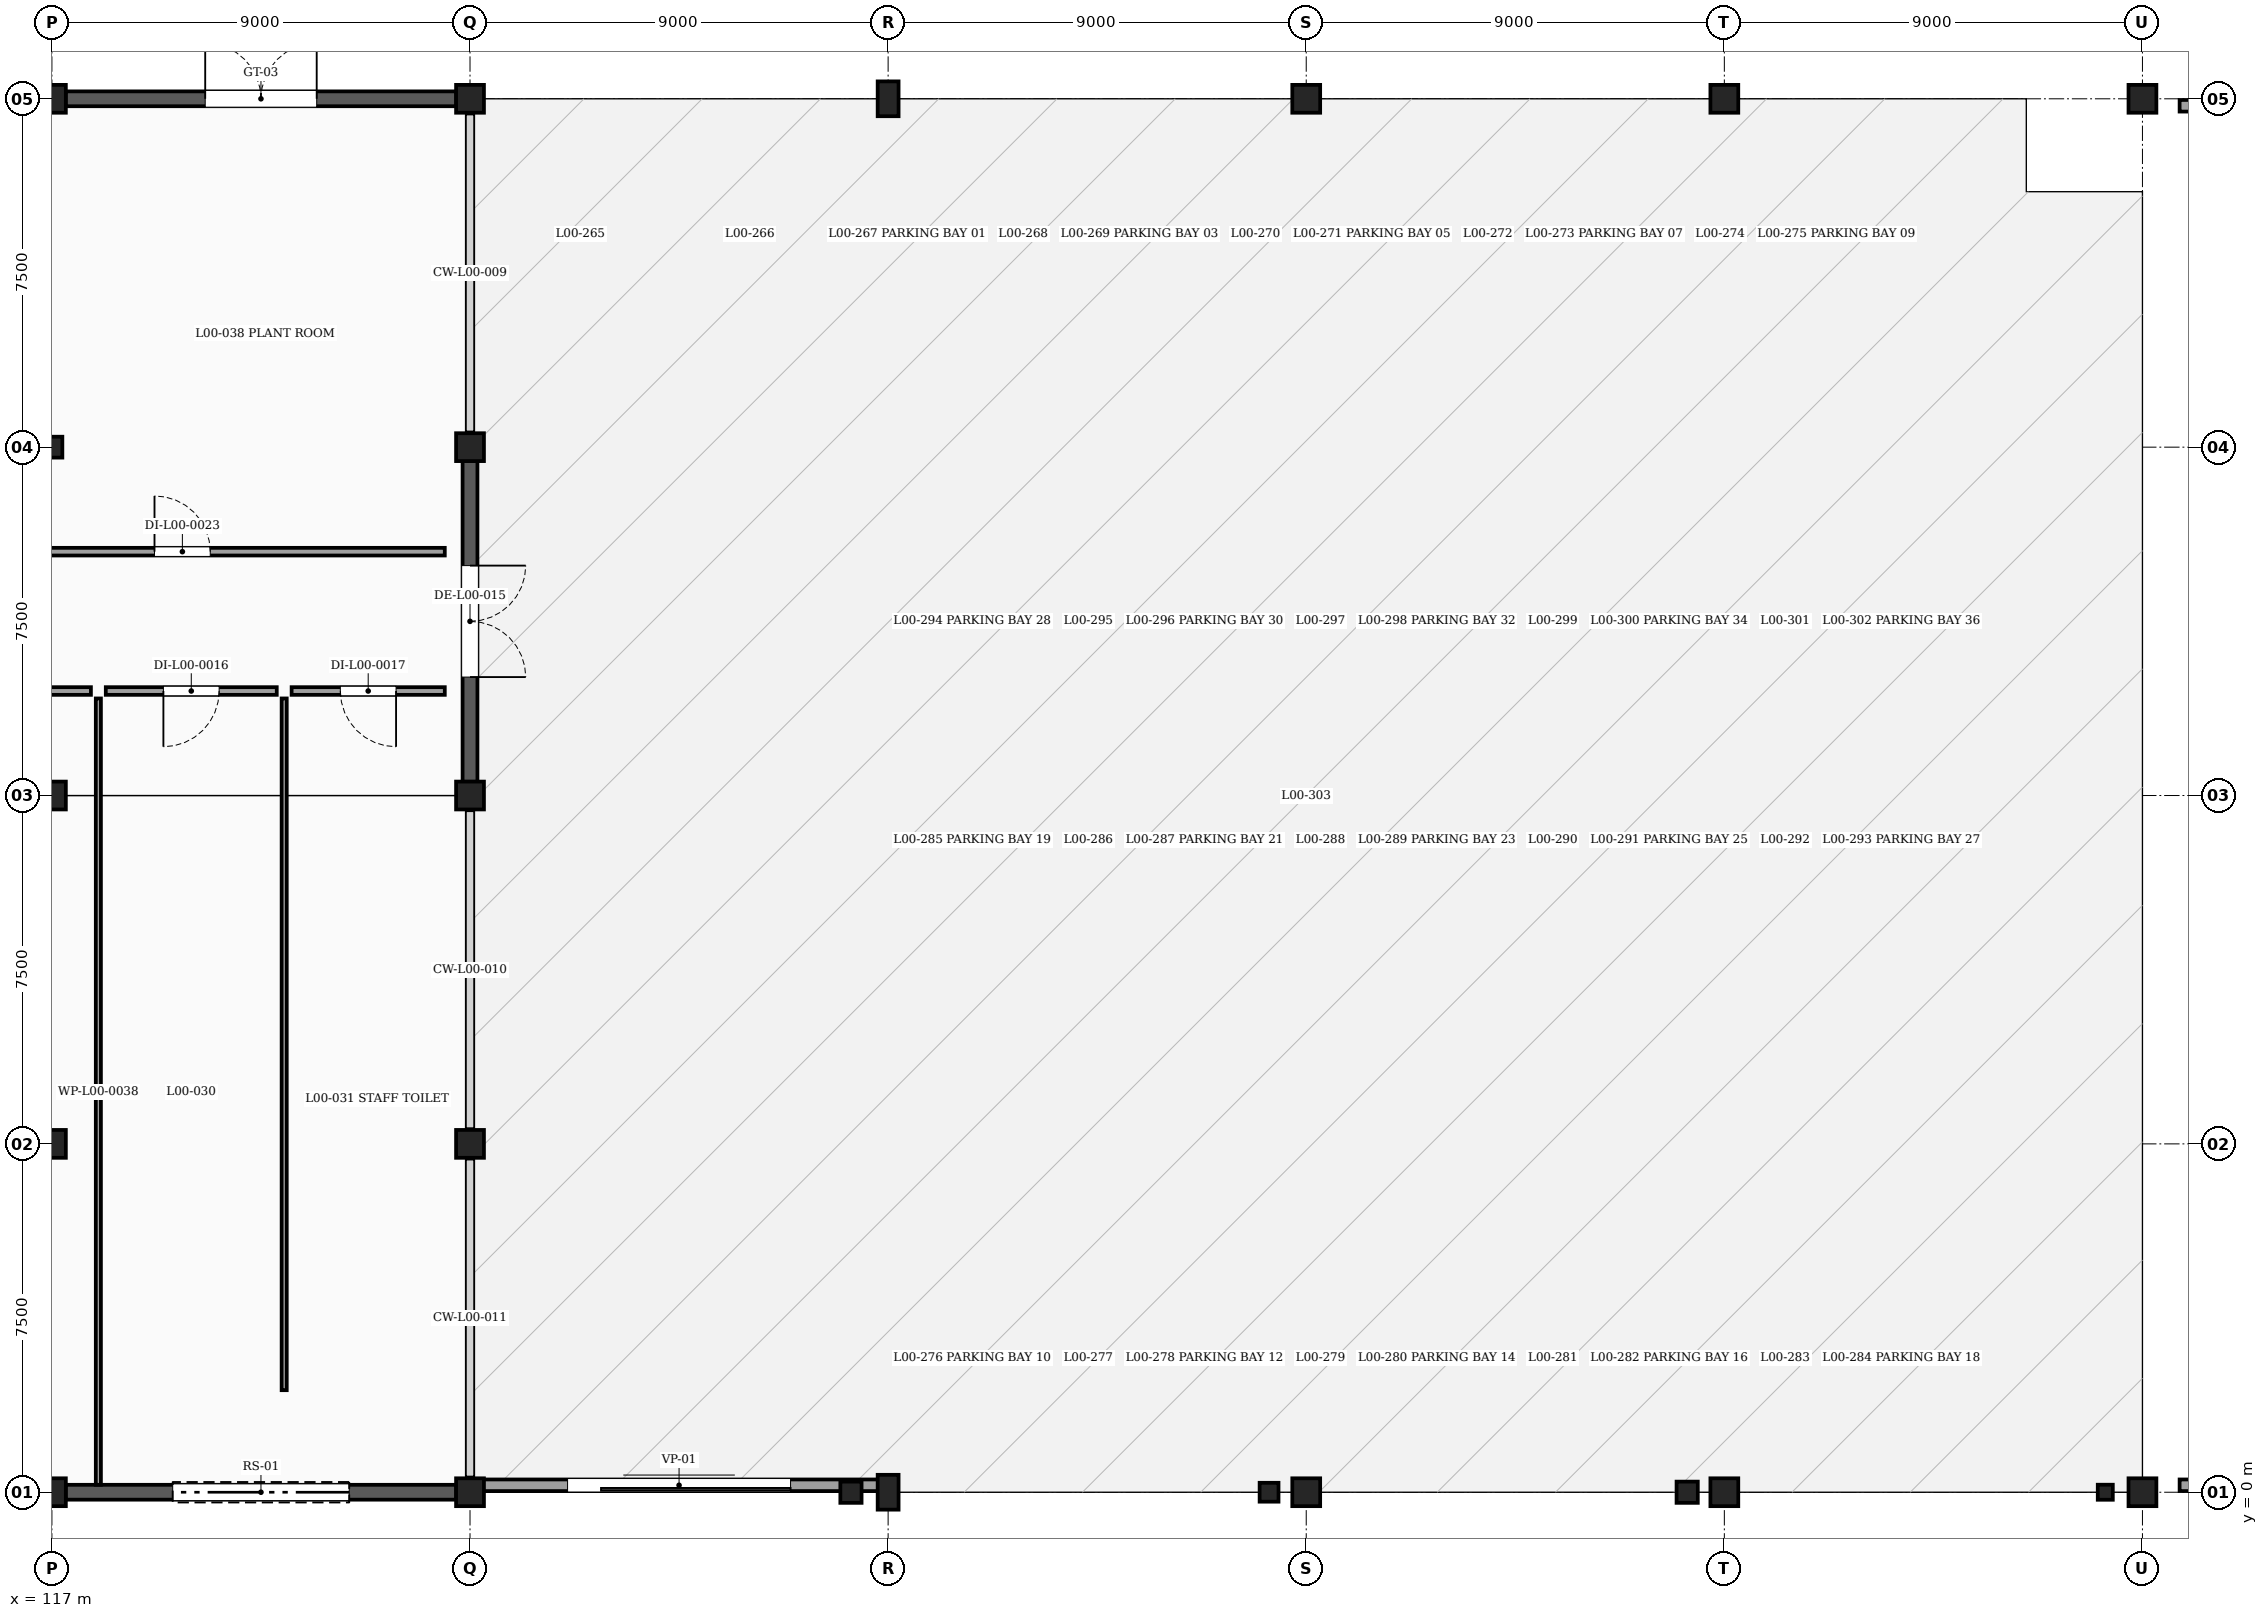
"""IFC4 building model, lengths in metres.
Left out: names, types, materials, properties, quantities, classifications, styles, units other than length and angle.
Written with IfcOpenShell. Run it as: python <this file> out.ifc"""

import sys

from ifc_helpers import new_model, si_unit, direction, frame, frame_2d, origin, origin_2d, place, context, subcontext, project, spatial, rectangle, hollow_circle, extrude, element, fill, save


model = new_model("IFC4")
c1 = context("Model", 3, precision=1e-05, world=origin(), true_north=direction((0.0, 1.0)))
c2 = subcontext(c1, "Body", "Model", "MODEL_VIEW")
j1 = project(units=[si_unit("LENGTHUNIT", "METRE"), si_unit("PLANEANGLEUNIT", "RADIAN")], contexts=[c1])
p1 = place(None, origin())
s1 = spatial("IfcSite", under=j1, at=p1, CompositionType="ELEMENT")
p2 = place(p1, origin())
s2 = spatial("IfcBuilding", under=s1, at=p2, CompositionType="ELEMENT")
p3 = place(p2, origin())
s3 = spatial("IfcBuildingStorey", under=s2, at=p3, CompositionType="ELEMENT", Elevation=0.0)
for number, where, z_axis, x_axis in (
    (1, (117.0, 0.0, -0.25), (0.0, 0.0, 1.0), (1.0, 0.0, 0.0)),
    (2, (126.0, 0.0, -0.25), (0.0, 0.0, 1.0), (1.0, 0.0, 0.0)),
):
    element("IfcColumn", number, at=place(p3, frame(where, z_axis=z_axis, x_axis=x_axis)), inside=s3, PredefinedType="COLUMN", context=c2, shape_type="SweptSolid", body=[
        extrude(rectangle(XDim=0.6, YDim=0.6, at=origin_2d()), origin(), (0.0, 0.0, 1.0), 4.75),
    ])
p4 = place(p3, frame((135.0, 0.0, -0.25), z_axis=(0.0, 0.0, 1.0), x_axis=(1.0, 0.0, 0.0)))
e3 = element("IfcColumn", 3, at=p4, inside=s3, PredefinedType="COLUMN", context=c2, shape_type="SweptSolid", body=[
    extrude(rectangle(XDim=0.45, YDim=0.75, at=origin_2d()), origin(), (0.0, 0.0, 1.0), 4.75),
])
for number, where, z_axis, x_axis in (
    (4, (144.0, 0.0, -0.25), (0.0, 0.0, 1.0), (1.0, 0.0, 0.0)),
    (5, (153.0, 0.0, -0.25), (0.0, 0.0, 1.0), (1.0, 0.0, 0.0)),
    (6, (162.0, 0.0, -0.25), (0.0, 0.0, 1.0), (1.0, 0.0, 0.0)),
    (7, (117.0, 7.5, -0.25), (0.0, 0.0, 1.0), (1.0, 0.0, 0.0)),
    (8, (126.0, 7.5, -0.25), (0.0, 0.0, 1.0), (1.0, 0.0, 0.0)),
    (9, (117.0, 15.0, -0.25), (0.0, 0.0, 1.0), (1.0, 0.0, 0.0)),
    (10, (126.0, 15.0, -0.25), (0.0, 0.0, 1.0), (1.0, 0.0, 0.0)),
):
    element("IfcColumn", number, at=place(p3, frame(where, z_axis=z_axis, x_axis=x_axis)), inside=s3, PredefinedType="COLUMN", context=c2, shape_type="SweptSolid", body=[
        extrude(rectangle(XDim=0.6, YDim=0.6, at=origin_2d()), origin(), (0.0, 0.0, 1.0), 4.75),
    ])
p5 = place(p3, frame((117.0, 22.5, -0.25), z_axis=(0.0, 0.0, 1.0), x_axis=(1.0, 0.0, 0.0)))
e11 = element("IfcColumn", 11, at=p5, inside=s3, PredefinedType="COLUMN", context=c2, shape_type="SweptSolid", body=[
    extrude(rectangle(XDim=0.45, YDim=0.45, at=origin_2d()), origin(), (0.0, 0.0, 1.0), 4.75),
])
for number, where, z_axis, x_axis in (
    (12, (126.0, 22.5, -0.25), (0.0, 0.0, 1.0), (1.0, 0.0, 0.0)),
    (13, (117.0, 30.0, -0.25), (0.0, 0.0, 1.0), (1.0, 0.0, 0.0)),
    (14, (126.0, 30.0, -0.25), (0.0, 0.0, 1.0), (1.0, 0.0, 0.0)),
):
    element("IfcColumn", number, at=place(p3, frame(where, z_axis=z_axis, x_axis=x_axis)), inside=s3, PredefinedType="COLUMN", context=c2, shape_type="SweptSolid", body=[
        extrude(rectangle(XDim=0.6, YDim=0.6, at=origin_2d()), origin(), (0.0, 0.0, 1.0), 4.75),
    ])
p6 = place(p3, frame((135.0, 30.0, -0.25), z_axis=(0.0, 0.0, 1.0), x_axis=(1.0, 0.0, 0.0)))
e15 = element("IfcColumn", 15, at=p6, inside=s3, PredefinedType="COLUMN", context=c2, shape_type="SweptSolid", body=[
    extrude(rectangle(XDim=0.45, YDim=0.75, at=origin_2d()), origin(), (0.0, 0.0, 1.0), 4.75),
])
for number, where, z_axis, x_axis in (
    (16, (144.0, 30.0, -0.25), (0.0, 0.0, 1.0), (1.0, 0.0, 0.0)),
    (17, (153.0, 30.0, -0.25), (0.0, 0.0, 1.0), (1.0, 0.0, 0.0)),
    (18, (162.0, 30.0, -0.25), (0.0, 0.0, 1.0), (1.0, 0.0, 0.0)),
):
    element("IfcColumn", number, at=place(p3, frame(where, z_axis=z_axis, x_axis=x_axis)), inside=s3, PredefinedType="COLUMN", context=c2, shape_type="SweptSolid", body=[
        extrude(rectangle(XDim=0.6, YDim=0.6, at=origin_2d()), origin(), (0.0, 0.0, 1.0), 4.75),
    ])
p7 = place(p3, frame((134.2, 0.0, -0.25), z_axis=(0.02841796458, 0.0, 0.999596128088), x_axis=(0.0, 1.0, 0.0)))
e19 = element("IfcColumn", 19, at=p7, inside=s3, PredefinedType="PILASTER", context=c2, shape_type="SweptSolid", body=[
    extrude(hollow_circle(Radius=0.229, WallThickness=0.013, at=origin_2d()), origin(), (0.0, 0.0, 1.0), 4.227),
])
p8 = place(p3, frame((143.2, 0.0, -0.25), z_axis=(0.02841796458, 0.0, 0.999596128088), x_axis=(0.0, 1.0, 0.0)))
e20 = element("IfcColumn", 20, at=p8, inside=s3, PredefinedType="PILASTER", context=c2, shape_type="SweptSolid", body=[
    extrude(hollow_circle(Radius=0.203, WallThickness=0.013, at=origin_2d()), origin(), (0.0, 0.0, 1.0), 4.227),
])
p9 = place(p3, frame((152.2, 0.0, -0.25), z_axis=(0.02841796458, 0.0, 0.999596128088), x_axis=(0.0, 1.0, 0.0)))
e21 = element("IfcColumn", 21, at=p9, inside=s3, PredefinedType="PILASTER", context=c2, shape_type="SweptSolid", body=[
    extrude(hollow_circle(Radius=0.229, WallThickness=0.013, at=origin_2d()), origin(), (0.0, 0.0, 1.0), 4.227),
])
p10 = place(p3, frame((161.2, 0.0, -0.25), z_axis=(0.02841796458, 0.0, 0.999596128088), x_axis=(0.0, 1.0, 0.0)))
e22 = element("IfcColumn", 22, at=p10, inside=s3, PredefinedType="PILASTER", context=c2, shape_type="SweptSolid", body=[
    extrude(hollow_circle(Radius=0.162, WallThickness=0.01, at=origin_2d()), origin(), (0.0, 0.0, 1.0), 4.227),
])
p11 = place(p3, frame((117.296, 30.0, 0.0), z_axis=(0.0, 0.0, 1.0), x_axis=(1.0, 0.0, 0.0)))
e23 = element("IfcWall", 23, at=p11, inside=s3, PredefinedType="SOLIDWALL", context=c2, shape_type="SweptSolid", body=[
    extrude(rectangle(XDim=8.408, YDim=0.32, at=frame_2d((4.204, 0.0))), origin(), (0.0, 0.0, 1.0), 4.1),
])
p12 = place(p11, frame((3.004, 0.0, 0.0)))
e24 = element("IfcOpeningElement", 24, at=p12, cuts=e23, PredefinedType="OPENING", context=c2, shape_type="SweptSolid", body=[
    extrude(rectangle(XDim=2.4, YDim=2.4, at=frame_2d((1.2, 1.2))), frame((0.0, 0.17, 0.0), z_axis=(0.0, -1.0, 0.0), x_axis=(1.0, 0.0, 0.0)), (0.0, 0.0, 1.0), 0.34),
])
p13 = place(p3, frame((126.0, 22.204, 0.0), z_axis=(0.0, 0.0, 1.0), x_axis=(0.0, -1.0, 0.0)))
e25 = element("IfcWall", 25, at=p13, inside=s3, PredefinedType="SOLIDWALL", context=c2, shape_type="SweptSolid", body=[
    extrude(rectangle(XDim=6.908, YDim=0.32, at=frame_2d((3.454, 0.0))), origin(), (0.0, 0.0, 1.0), 3.442),
])
p14 = place(p13, frame((2.254, 0.0, 0.0)))
e26 = element("IfcOpeningElement", 26, at=p14, cuts=e25, PredefinedType="OPENING", context=c2, shape_type="SweptSolid", body=[
    extrude(rectangle(XDim=2.4, YDim=2.25, at=frame_2d((1.2, 1.125))), frame((0.0, 0.17, 0.0), z_axis=(0.0, -1.0, 0.0), x_axis=(1.0, 0.0, 0.0)), (0.0, 0.0, 1.0), 0.34),
])
p15 = place(p3, frame((125.704, 0.0, 0.0), z_axis=(0.0, 0.0, 1.0), x_axis=(-1.0, 0.0, 0.0)))
e27 = element("IfcWall", 27, at=p15, inside=s3, PredefinedType="SOLIDWALL", context=c2, shape_type="SweptSolid", body=[
    extrude(rectangle(XDim=8.408, YDim=0.32, at=frame_2d((4.204, 0.0))), origin(), (0.0, 0.0, 1.0), 4.1),
])
p16 = place(p15, frame((2.304, 0.0, 0.0)))
e28 = element("IfcOpeningElement", 28, at=p16, cuts=e27, PredefinedType="OPENING", context=c2, shape_type="SweptSolid", body=[
    extrude(rectangle(XDim=3.8, YDim=3.5, at=frame_2d((1.9, 1.75))), frame((0.0, 0.17, 0.0), z_axis=(0.0, -1.0, 0.0), x_axis=(1.0, 0.0, 0.0)), (0.0, 0.0, 1.0), 0.34),
])
p17 = place(p3, frame((134.8, 0.15, 0.0), z_axis=(0.0, 0.0, 1.0), x_axis=(-1.0, 0.0, 0.0)))
e29 = element("IfcWall", 29, at=p17, inside=s3, PredefinedType="SOLIDWALL", context=c2, shape_type="SweptSolid", body=[
    extrude(rectangle(XDim=8.6, YDim=0.25, at=frame_2d((4.3, 0.0))), origin(), (0.0, 0.0, 1.0), 3.85),
])
p18 = place(p17, frame((1.9, 0.0, 0.0)))
e30 = element("IfcOpeningElement", 30, at=p18, cuts=e29, PredefinedType="OPENING", context=c2, shape_type="SweptSolid", body=[
    extrude(rectangle(XDim=4.8, YDim=3.5, at=frame_2d((2.4, 1.75))), frame((0.0, 0.135, 0.0), z_axis=(0.0, -1.0, 0.0), x_axis=(1.0, 0.0, 0.0)), (0.0, 0.0, 1.0), 0.27),
])
p19 = place(p3, frame((170.2, 0.15, 0.0), z_axis=(0.0, 0.0, 1.0), x_axis=(-1.0, 0.0, 0.0)))
e31 = element("IfcWall", 31, at=p19, inside=s3, PredefinedType="SOLIDWALL", context=c2, shape_type="SweptSolid", body=[
    extrude(rectangle(XDim=7.4, YDim=0.25, at=frame_2d((3.7, 0.0))), origin(), (0.0, 0.0, 1.0), 3.85),
])
p20 = place(p19, frame((1.3, 0.0, 0.0)))
e32 = element("IfcOpeningElement", 32, at=p20, cuts=e31, PredefinedType="OPENING", context=c2, shape_type="SweptSolid", body=[
    extrude(rectangle(XDim=4.8, YDim=3.5, at=frame_2d((2.4, 1.75))), frame((0.0, 0.135, 0.0), z_axis=(0.0, -1.0, 0.0), x_axis=(1.0, 0.0, 0.0)), (0.0, 0.0, 1.0), 0.27),
])
p21 = place(p3, frame((162.8, 29.85, 0.0), z_axis=(0.0, 0.0, 1.0), x_axis=(1.0, 0.0, 0.0)))
e33 = element("IfcWall", 33, at=p21, inside=s3, PredefinedType="SOLIDWALL", context=c2, shape_type="SweptSolid", body=[
    extrude(rectangle(XDim=7.4, YDim=0.25, at=frame_2d((3.7, 0.0))), origin(), (0.0, 0.0, 1.0), 3.85),
])
p22 = place(p21, frame((2.5, 0.0, 0.0)))
e34 = element("IfcOpeningElement", 34, at=p22, cuts=e33, PredefinedType="OPENING", context=c2, shape_type="SweptSolid", body=[
    extrude(rectangle(XDim=2.4, YDim=2.4, at=frame_2d((1.2, 1.2))), frame((0.0, 0.135, 0.0), z_axis=(0.0, -1.0, 0.0), x_axis=(1.0, 0.0, 0.0)), (0.0, 0.0, 1.0), 0.27),
])
p23 = place(p3, frame((118.0, 0.16, 0.0), z_axis=(0.0, 0.0, 1.0), x_axis=(0.0, 1.0, 0.0)))
e35 = element("IfcWall", 35, at=p23, inside=s3, PredefinedType="PARTITIONING", context=c2, shape_type="SweptSolid", body=[
    extrude(rectangle(XDim=16.93, YDim=0.11, at=frame_2d((8.465, 0.0))), origin(), (0.0, 0.0, 1.0), 4.1),
])
p24 = place(p3, frame((117.84, 17.25, 0.0), z_axis=(0.0, 0.0, 1.0), x_axis=(-1.0, 0.0, 0.0)))
e36 = element("IfcWall", 36, at=p24, inside=s3, PredefinedType="PARTITIONING", context=c2, shape_type="SweptSolid", body=[
    extrude(rectangle(XDim=3.68, YDim=0.165, at=frame_2d((1.84, 0.0))), origin(), (0.0, 0.0, 1.0), 4.1),
])
p25 = place(p3, frame((122.0, 2.197, 0.0), z_axis=(0.0, 0.0, 1.0), x_axis=(0.0, 1.0, 0.0)))
e37 = element("IfcWall", 37, at=p25, inside=s3, PredefinedType="PARTITIONING", context=c2, shape_type="SweptSolid", body=[
    extrude(rectangle(XDim=14.893, YDim=0.11, at=frame_2d((7.447, 0.0))), origin(), (0.0, 0.0, 1.0), 4.1),
])
p26 = place(p3, frame((121.84, 17.25, 0.0), z_axis=(0.0, 0.0, 1.0), x_axis=(-1.0, 0.0, 0.0)))
e38 = element("IfcWall", 38, at=p26, inside=s3, PredefinedType="PARTITIONING", context=c2, shape_type="SweptSolid", body=[
    extrude(rectangle(XDim=3.68, YDim=0.165, at=frame_2d((1.84, 0.0))), origin(), (0.0, 0.0, 1.0), 4.1),
])
p27 = place(p26, frame((1.24, 0.0, 0.0)))
e39 = element("IfcOpeningElement", 39, at=p27, cuts=e38, PredefinedType="OPENING", context=c2, shape_type="SweptSolid", body=[
    extrude(rectangle(XDim=1.2, YDim=2.15, at=frame_2d((0.6, 1.075))), frame((0.0, 0.093, 0.0), z_axis=(0.0, -1.0, 0.0), x_axis=(1.0, 0.0, 0.0)), (0.0, 0.0, 1.0), 0.185),
])
p28 = place(p3, frame((125.457, 17.25, 0.0), z_axis=(0.0, 0.0, 1.0), x_axis=(-1.0, 0.0, 0.0)))
e40 = element("IfcWall", 40, at=p28, inside=s3, PredefinedType="PARTITIONING", context=c2, shape_type="SweptSolid", body=[
    extrude(rectangle(XDim=3.297, YDim=0.165, at=frame_2d((1.648, 0.0))), origin(), (0.0, 0.0, 1.0), 4.1),
])
p29 = place(p28, frame((1.049, 0.0, 0.0)))
e41 = element("IfcOpeningElement", 41, at=p29, cuts=e40, PredefinedType="OPENING", context=c2, shape_type="SweptSolid", body=[
    extrude(rectangle(XDim=1.2, YDim=2.15, at=frame_2d((0.6, 1.075))), frame((0.0, 0.093, 0.0), z_axis=(0.0, -1.0, 0.0), x_axis=(1.0, 0.0, 0.0)), (0.0, 0.0, 1.0), 0.185),
])
p30 = place(p3, frame((114.16, 20.25, 0.0), z_axis=(0.0, 0.0, 1.0), x_axis=(1.0, 0.0, 0.0)))
e42 = element("IfcWall", 42, at=p30, inside=s3, PredefinedType="PARTITIONING", context=c2, shape_type="SweptSolid", body=[
    extrude(rectangle(XDim=11.297, YDim=0.165, at=frame_2d((5.648, 0.0))), origin(), (0.0, 0.0, 1.0), 4.1),
])
p31 = place(p30, frame((5.049, 0.0, 0.0)))
e43 = element("IfcOpeningElement", 43, at=p31, cuts=e42, PredefinedType="OPENING", context=c2, shape_type="SweptSolid", body=[
    extrude(rectangle(XDim=1.2, YDim=2.15, at=frame_2d((0.6, 1.075))), frame((0.0, 0.093, 0.0), z_axis=(0.0, -1.0, 0.0), x_axis=(1.0, 0.0, 0.0)), (0.0, 0.0, 1.0), 0.185),
])
p32 = place(p12, origin())
e44 = element("IfcDoor", 44, at=p32, inside=s3, OperationType="DOUBLE_DOOR_SINGLE_SWING", PredefinedType="GATE", context=c2, shape_type="SweptSolid", body=[
    extrude(rectangle(XDim=2.4, YDim=2.4, at=frame_2d((1.2, 1.2))), frame((0.0, 0.025, 0.0), z_axis=(0.0, -1.0, 0.0), x_axis=(1.0, 0.0, 0.0)), (0.0, 0.0, 1.0), 0.05),
])
fill(e24, e44)
p33 = place(p14, origin())
e45 = element("IfcDoor", 45, at=p33, inside=s3, OperationType="DOUBLE_DOOR_SINGLE_SWING", PredefinedType="DOOR", context=c2, shape_type="SweptSolid", body=[
    extrude(rectangle(XDim=2.4, YDim=2.25, at=frame_2d((1.2, 1.125))), frame((0.0, 0.025, 0.0), z_axis=(0.0, -1.0, 0.0), x_axis=(1.0, 0.0, 0.0)), (0.0, 0.0, 1.0), 0.05),
])
fill(e26, e45)
p34 = place(p16, origin())
e46 = element("IfcDoor", 46, at=p34, inside=s3, OperationType="ROLLINGUP", PredefinedType="GATE", context=c2, shape_type="SweptSolid", body=[
    extrude(rectangle(XDim=3.8, YDim=3.5, at=frame_2d((1.9, 1.75))), frame((0.0, 0.025, 0.0), z_axis=(0.0, -1.0, 0.0), x_axis=(1.0, 0.0, 0.0)), (0.0, 0.0, 1.0), 0.05),
])
fill(e28, e46)
p35 = place(p18, origin())
e47 = element("IfcDoor", 47, at=p35, inside=s3, OperationType="SLIDING_TO_LEFT", PredefinedType="GATE", context=c2, shape_type="SweptSolid", body=[
    extrude(rectangle(XDim=4.8, YDim=3.5, at=frame_2d((2.4, 1.75))), frame((0.0, 0.025, 0.0), z_axis=(0.0, -1.0, 0.0), x_axis=(1.0, 0.0, 0.0)), (0.0, 0.0, 1.0), 0.05),
])
fill(e30, e47)
p36 = place(p27, origin())
e48 = element("IfcDoor", 48, at=p36, inside=s3, OperationType="SINGLE_SWING_RIGHT", PredefinedType="DOOR", context=c2, shape_type="SweptSolid", body=[
    extrude(rectangle(XDim=1.2, YDim=2.15, at=frame_2d((0.6, 1.075))), frame((0.0, 0.025, 0.0), z_axis=(0.0, -1.0, 0.0), x_axis=(1.0, 0.0, 0.0)), (0.0, 0.0, 1.0), 0.05),
])
fill(e39, e48)
p37 = place(p29, origin())
e49 = element("IfcDoor", 49, at=p37, inside=s3, OperationType="SINGLE_SWING_LEFT", PredefinedType="DOOR", context=c2, shape_type="SweptSolid", body=[
    extrude(rectangle(XDim=1.2, YDim=2.15, at=frame_2d((0.6, 1.075))), frame((0.0, 0.025, 0.0), z_axis=(0.0, -1.0, 0.0), x_axis=(1.0, 0.0, 0.0)), (0.0, 0.0, 1.0), 0.05),
])
fill(e41, e49)
p38 = place(p31, origin())
e50 = element("IfcDoor", 50, at=p38, inside=s3, OperationType="SINGLE_SWING_LEFT", PredefinedType="DOOR", context=c2, shape_type="SweptSolid", body=[
    extrude(rectangle(XDim=1.2, YDim=2.15, at=frame_2d((0.6, 1.075))), frame((0.0, 0.025, 0.0), z_axis=(0.0, -1.0, 0.0), x_axis=(1.0, 0.0, 0.0)), (0.0, 0.0, 1.0), 0.05),
])
fill(e43, e50)
save(model, sys.argv[1])
